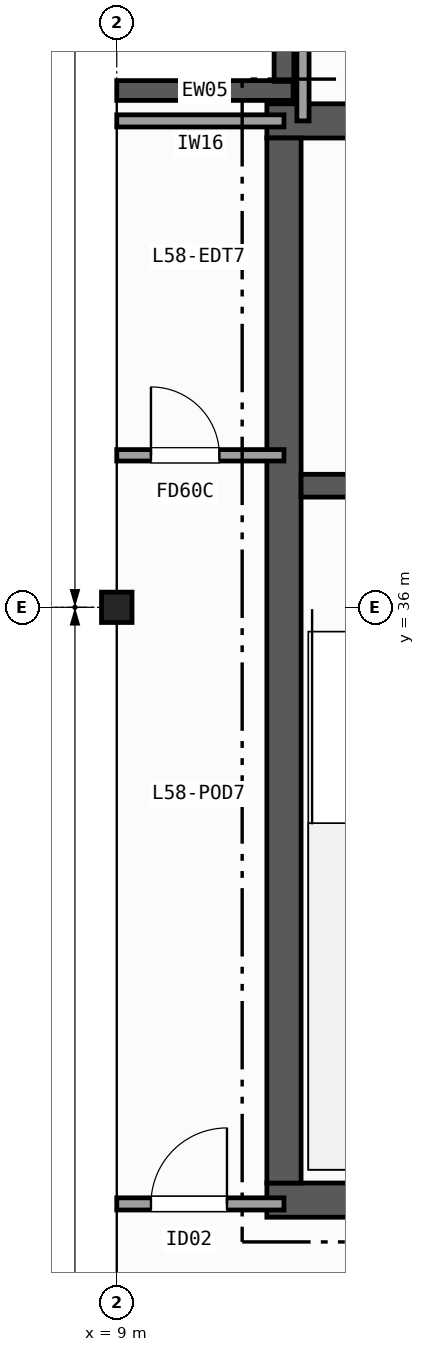
"""IFC4 building model, lengths in metres.
Left out: names, types, materials, properties, quantities, classifications, styles, units other than length and angle.
Written with IfcOpenShell. Run it as: python <this file> out.ifc"""

import sys

from ifc_helpers import new_model, si_unit, direction, frame, frame_2d, origin, origin_2d, place, context, subcontext, project, spatial, rectangle, i_section, extrude, element, fill, save


model = new_model("IFC4")
c1 = context("Model", 3, precision=1e-05, world=origin(), true_north=direction((0.0, 1.0)))
c2 = subcontext(c1, "Body", "Model", "MODEL_VIEW")
j1 = project(units=[si_unit("LENGTHUNIT", "METRE"), si_unit("PLANEANGLEUNIT", "RADIAN")], contexts=[c1])
p1 = place(None, origin())
s1 = spatial("IfcSite", under=j1, at=p1, CompositionType="ELEMENT")
p2 = place(p1, origin())
s2 = spatial("IfcBuilding", under=s1, at=p2, CompositionType="ELEMENT")
p3 = place(p2, frame((0.0, 0.0, 232.1)))
s3 = spatial("IfcBuildingStorey", under=s2, at=p3, CompositionType="ELEMENT", Elevation=232.1)
p4 = place(p3, frame((9.0, 36.0, 0.0), z_axis=(0.0, 0.0, 1.0), x_axis=(1.0, 0.0, 0.0)))
e1 = element("IfcColumn", 1, at=p4, inside=s3, PredefinedType="COLUMN", context=c2, shape_type="SweptSolid", body=[
    extrude(i_section(OverallWidth=0.401, OverallDepth=0.399, WebThickness=0.025, FlangeThickness=0.04, FilletRadius=0.015, at=origin_2d()), origin(), (0.0, 0.0, 1.0), 3.7),
])
p5 = place(p3, frame((9.0, 42.8, 0.0), z_axis=(0.0, 0.0, 1.0), x_axis=(1.0, 0.0, 0.0)))
e2 = element("IfcWall", 2, at=p5, inside=s3, PredefinedType="SOLIDWALL", context=c2, shape_type="SweptSolid", body=[
    extrude(rectangle(XDim=2.32, YDim=0.26, at=frame_2d((1.16, 0.0))), origin(), (0.0, 0.0, 1.0), 3.37),
])
p6 = place(p3, frame((11.2, 42.92, 0.0), z_axis=(0.0, 0.0, 1.0), x_axis=(0.0, 1.0, 0.0)))
e3 = element("IfcWall", 3, at=p6, inside=s3, PredefinedType="SOLIDWALL", context=c2, shape_type="SweptSolid", body=[
    extrude(rectangle(XDim=2.08, YDim=0.26, at=frame_2d((1.04, 0.0))), origin(), (0.0, 0.0, 1.0), 3.37),
])
p7 = place(p3, frame((10.975, 28.2, 0.0), z_axis=(0.0, 0.0, 1.0), x_axis=(1.0, 0.0, 0.0)))
e4 = element("IfcWall", 4, at=p7, inside=s3, PredefinedType="SHEAR", context=c2, shape_type="SweptSolid", body=[
    extrude(rectangle(XDim=13.85, YDim=0.45, at=frame_2d((6.925, 0.0))), origin(), (0.0, 0.0, 1.0), 3.37),
])
p8 = place(p3, frame((24.825, 42.4, 0.0), z_axis=(0.0, 0.0, 1.0), x_axis=(-1.0, 0.0, 0.0)))
e5 = element("IfcWall", 5, at=p8, inside=s3, PredefinedType="SHEAR", context=c2, shape_type="SweptSolid", body=[
    extrude(rectangle(XDim=13.85, YDim=0.45, at=frame_2d((6.925, 0.0))), origin(), (0.0, 0.0, 1.0), 3.37),
])
p9 = place(p8, frame((10.025, 0.0, 0.0)))
e6 = element("IfcOpeningElement", 6, at=p9, cuts=e5, PredefinedType="OPENING", context=c2, shape_type="SweptSolid", body=[
    extrude(rectangle(XDim=1.2, YDim=2.15, at=frame_2d((0.6, 1.075))), frame((0.0, 0.235, 0.0), z_axis=(0.0, -1.0, 0.0), x_axis=(1.0, 0.0, 0.0)), (0.0, 0.0, 1.0), 0.47),
])
p10 = place(p8, frame((2.975, 0.0, 0.0)))
e7 = element("IfcOpeningElement", 7, at=p10, cuts=e5, PredefinedType="OPENING", context=c2, shape_type="SweptSolid", body=[
    extrude(rectangle(XDim=0.9, YDim=2.1, at=frame_2d((0.45, 1.05))), frame((0.0, 0.235, 0.0), z_axis=(0.0, -1.0, 0.0), x_axis=(1.0, 0.0, 0.0)), (0.0, 0.0, 1.0), 0.47),
])
p11 = place(p3, frame((11.2, 42.175, 0.0), z_axis=(0.0, 0.0, 1.0), x_axis=(0.0, -1.0, 0.0)))
e8 = element("IfcWall", 8, at=p11, inside=s3, PredefinedType="SHEAR", context=c2, shape_type="SweptSolid", body=[
    extrude(rectangle(XDim=13.75, YDim=0.45, at=frame_2d((6.875, 0.0))), origin(), (0.0, 0.0, 1.0), 3.37),
])
p12 = place(p3, frame((17.77, 37.6, 0.0), z_axis=(0.0, 0.0, 1.0), x_axis=(-1.0, 0.0, 0.0)))
e9 = element("IfcWall", 9, at=p12, inside=s3, PredefinedType="SHEAR", context=c2, shape_type="SweptSolid", body=[
    extrude(rectangle(XDim=6.345, YDim=0.3, at=frame_2d((3.172, 0.0))), origin(), (0.0, 0.0, 1.0), 3.37),
])
p13 = place(p12, frame((4.22, 0.0, 0.0)))
e10 = element("IfcOpeningElement", 10, at=p13, cuts=e9, PredefinedType="OPENING", context=c2, shape_type="SweptSolid", body=[
    extrude(rectangle(XDim=1.2, YDim=2.15, at=frame_2d((0.6, 1.075))), frame((0.0, 0.16, 0.0), z_axis=(0.0, -1.0, 0.0), x_axis=(1.0, 0.0, 0.0)), (0.0, 0.0, 1.0), 0.32),
])
p14 = place(p12, frame((1.12, 0.0, 0.0)))
e11 = element("IfcOpeningElement", 11, at=p14, cuts=e9, PredefinedType="OPENING", context=c2, shape_type="SweptSolid", body=[
    extrude(rectangle(XDim=1.2, YDim=2.15, at=frame_2d((0.6, 1.075))), frame((0.0, 0.16, 0.0), z_axis=(0.0, -1.0, 0.0), x_axis=(1.0, 0.0, 0.0)), (0.0, 0.0, 1.0), 0.32),
])
p15 = place(p3, frame((9.0, 28.15, 0.0), z_axis=(0.0, 0.0, 1.0), x_axis=(1.0, 0.0, 0.0)))
e12 = element("IfcWall", 12, at=p15, inside=s3, PredefinedType="PARTITIONING", context=c2, shape_type="SweptSolid", body=[
    extrude(rectangle(XDim=2.2, YDim=0.16, at=frame_2d((1.1, 0.0))), origin(), (0.0, 0.0, 1.0), 2.657),
])
p16 = place(p15, frame((0.45, 0.0, 0.0)))
e13 = element("IfcOpeningElement", 13, at=p16, cuts=e12, PredefinedType="OPENING", context=c2, shape_type="SweptSolid", body=[
    extrude(rectangle(XDim=1.0, YDim=2.1, at=frame_2d((0.5, 1.05))), frame((0.0, 0.09, 0.0), z_axis=(0.0, -1.0, 0.0), x_axis=(1.0, 0.0, 0.0)), (0.0, 0.0, 1.0), 0.18),
])
p17 = place(p3, frame((9.0, 42.4, 0.0), z_axis=(0.0, 0.0, 1.0), x_axis=(1.0, 0.0, 0.0)))
e14 = element("IfcWall", 14, at=p17, inside=s3, PredefinedType="PARTITIONING", context=c2, shape_type="SweptSolid", body=[
    extrude(rectangle(XDim=2.2, YDim=0.16, at=frame_2d((1.1, 0.0))), origin(), (0.0, 0.0, 1.0), 3.37),
])
p18 = place(p3, frame((11.45, 42.4, 0.0), z_axis=(0.0, 0.0, 1.0), x_axis=(0.0, 1.0, 0.0)))
e15 = element("IfcWall", 15, at=p18, inside=s3, PredefinedType="PARTITIONING", context=c2, shape_type="SweptSolid", body=[
    extrude(rectangle(XDim=2.666, YDim=0.16, at=frame_2d((1.333, 0.0))), origin(), (0.0, 0.0, 1.0), 3.37),
])
p19 = place(p3, frame((9.0, 38.0, 0.0), z_axis=(0.0, 0.0, 1.0), x_axis=(1.0, 0.0, 0.0)))
e16 = element("IfcWall", 16, at=p19, inside=s3, PredefinedType="PARTITIONING", context=c2, shape_type="SweptSolid", body=[
    extrude(rectangle(XDim=2.2, YDim=0.15, at=frame_2d((1.1, 0.0))), origin(), (0.0, 0.0, 1.0), 3.37),
])
p20 = place(p19, frame((0.45, 0.0, 0.0)))
e17 = element("IfcOpeningElement", 17, at=p20, cuts=e16, PredefinedType="OPENING", context=c2, shape_type="SweptSolid", body=[
    extrude(rectangle(XDim=0.9, YDim=2.1, at=frame_2d((0.45, 1.05))), frame((0.0, 0.085, 0.0), z_axis=(0.0, -1.0, 0.0), x_axis=(1.0, 0.0, 0.0)), (0.0, 0.0, 1.0), 0.17),
])
p21 = place(p16, origin())
e18 = element("IfcDoor", 18, at=p21, inside=s3, OperationType="SINGLE_SWING_RIGHT", PredefinedType="DOOR", context=c2, shape_type="SweptSolid", body=[
    extrude(rectangle(XDim=1.0, YDim=2.1, at=frame_2d((0.5, 1.05))), frame((0.0, 0.025, 0.0), z_axis=(0.0, -1.0, 0.0), x_axis=(1.0, 0.0, 0.0)), (0.0, 0.0, 1.0), 0.05),
])
fill(e13, e18)
p22 = place(p20, origin())
e19 = element("IfcDoor", 19, at=p22, inside=s3, OperationType="SINGLE_SWING_LEFT", PredefinedType="DOOR", context=c2, shape_type="SweptSolid", body=[
    extrude(rectangle(XDim=0.9, YDim=2.1, at=frame_2d((0.45, 1.05))), frame((0.0, 0.025, 0.0), z_axis=(0.0, -1.0, 0.0), x_axis=(1.0, 0.0, 0.0)), (0.0, 0.0, 1.0), 0.05),
])
fill(e17, e19)
save(model, sys.argv[1])
